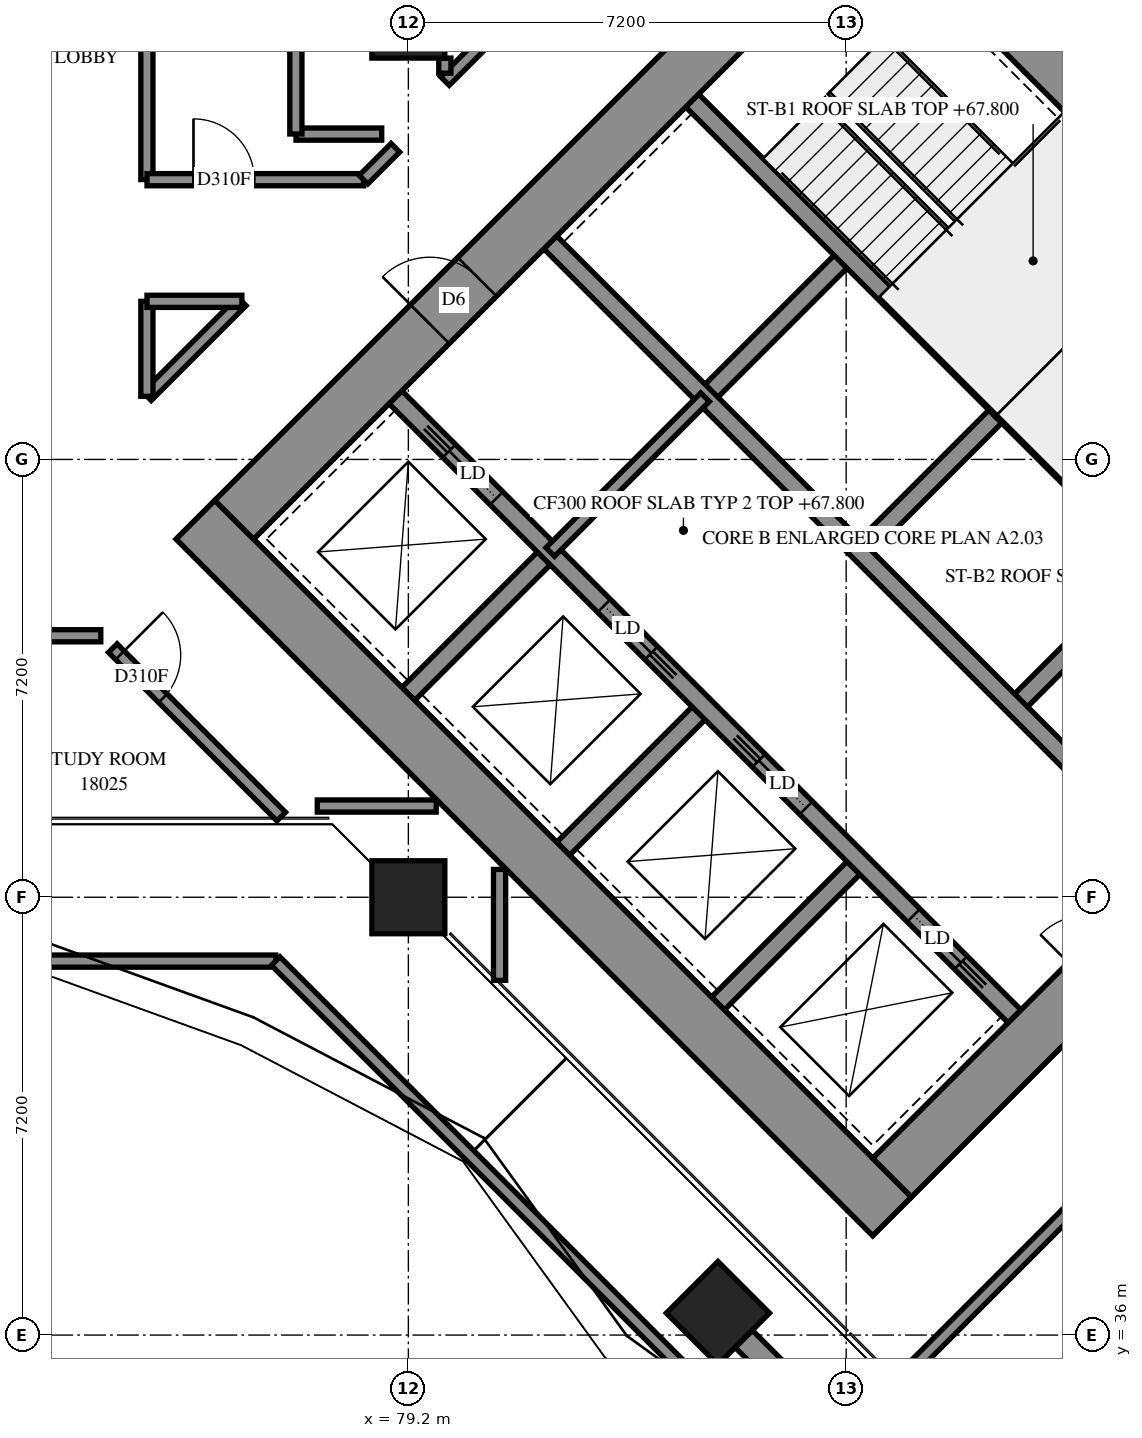
"""IFC4 building model, lengths in metres.
Left out: names, types, materials, properties, quantities, classifications, styles, units other than length and angle.
Written with IfcOpenShell. Run it as: python <this file> out.ifc"""

import sys

from ifc_helpers import new_model, si_unit, direction, frame, frame_2d, origin, origin_2d, place, context, subcontext, project, spatial, polyline, rectangle, outline, extrude, element, fill, save


model = new_model("IFC4")
c1 = context("Model", 3, precision=1e-05, world=origin(), true_north=direction((0.0, 1.0)))
c2 = subcontext(c1, "Body", "Model", "MODEL_VIEW")
j1 = project(units=[si_unit("LENGTHUNIT", "METRE"), si_unit("PLANEANGLEUNIT", "RADIAN")], contexts=[c1])
p1 = place(None, origin())
s1 = spatial("IfcSite", under=j1, at=p1, CompositionType="ELEMENT")
p2 = place(p1, origin())
s2 = spatial("IfcBuilding", under=s1, at=p2, CompositionType="ELEMENT")
p3 = place(p2, frame((0.0, 0.0, 67.8)))
s3 = spatial("IfcBuildingStorey", under=s2, at=p3, CompositionType="ELEMENT", Elevation=67.8)
for number, where, z_axis, x_axis in (
    (1, (79.2, 43.2, 0.0), (0.0, 0.0, 1.0), (1.0, 0.0, 0.0)),
    (2, (79.2, 57.6, 0.0), (0.0, 0.0, 1.0), (1.0, 0.0, 0.0)),
    (3, (84.291, 36.362, 0.0), (0.0, 0.0, 1.0), (0.707, -0.707, 0.0)),
):
    element("IfcColumn", number, at=place(p3, frame(where, z_axis=z_axis, x_axis=x_axis)), inside=s3, PredefinedType="COLUMN", context=c2, shape_type="SweptSolid", body=[
        extrude(rectangle(XDim=1.2, YDim=1.2, at=origin_2d()), origin(), (0.0, 0.0, 1.0), 3.9),
    ])
p4 = place(p3, frame((75.7, 49.408, -0.3), z_axis=(0.0, 0.0, 1.0), x_axis=(0.7071098676, -0.7071036948, 0.0)))
e4 = element("IfcWall", 4, at=p4, inside=s3, PredefinedType="SHEAR", context=c2, shape_type="SweptSolid", body=[
    extrude(rectangle(XDim=16.2, YDim=0.9, at=frame_2d((8.1, 0.0))), origin(), (0.0, 0.0, 1.0), 3.5),
])
p5 = place(p3, frame((86.519, 60.227, -0.3), z_axis=(0.0, 0.0, 1.0), x_axis=(0.7071036948, -0.7071098676, 0.0)))
e5 = element("IfcWall", 5, at=p5, inside=s3, PredefinedType="SHEAR", context=c2, shape_type="SweptSolid", body=[
    extrude(rectangle(XDim=16.2, YDim=0.9, at=frame_2d((8.1, 0.0))), origin(), (0.0, 0.0, 1.0), 3.5),
])
p6 = place(p5, frame((10.9, 0.0, 0.3)))
e6 = element("IfcOpeningElement", 6, at=p6, cuts=e5, PredefinedType="OPENING", context=c2, shape_type="SweptSolid", body=[
    extrude(rectangle(XDim=0.8, YDim=2.1, at=frame_2d((0.4, 1.05))), frame((0.0, 0.46, 0.0), z_axis=(0.0, -1.0, 0.0), x_axis=(1.0, 0.0, 0.0)), (0.0, 0.0, 1.0), 0.92),
])
p7 = place(p3, frame((76.336, 49.408, -0.3), z_axis=(0.0, 0.0, 1.0), x_axis=(0.7071067812, 0.7071067812, 0.0)))
e7 = element("IfcWall", 7, at=p7, inside=s3, PredefinedType="SHEAR", context=c2, shape_type="SweptSolid", body=[
    extrude(rectangle(XDim=14.4, YDim=0.9, at=frame_2d((7.2, 0.0))), origin(), (0.0, 0.0, 1.0), 3.5),
])
p8 = place(p7, frame((4.55, 0.0, 0.3)))
e8 = element("IfcOpeningElement", 8, at=p8, cuts=e7, PredefinedType="OPENING", context=c2, shape_type="SweptSolid", body=[
    extrude(rectangle(XDim=1.1, YDim=2.1, at=frame_2d((0.55, 1.05))), frame((0.0, 0.46, 0.0), z_axis=(0.0, -1.0, 0.0), x_axis=(1.0, 0.0, 0.0)), (0.0, 0.0, 1.0), 0.92),
])
p9 = place(p7, frame((11.35, 0.0, 0.3)))
e9 = element("IfcOpeningElement", 9, at=p9, cuts=e7, PredefinedType="OPENING", context=c2, shape_type="SweptSolid", body=[
    extrude(rectangle(XDim=1.1, YDim=2.1, at=frame_2d((0.55, 1.05))), frame((0.0, 0.46, 0.0), z_axis=(0.0, -1.0, 0.0), x_axis=(1.0, 0.0, 0.0)), (0.0, 0.0, 1.0), 0.92),
])
p10 = place(p3, frame((87.155, 38.589, -0.3), z_axis=(0.0, 0.0, 1.0), x_axis=(0.7071067812, 0.7071067812, 0.0)))
e10 = element("IfcWall", 10, at=p10, inside=s3, PredefinedType="SHEAR", context=c2, shape_type="SweptSolid", body=[
    extrude(rectangle(XDim=14.4, YDim=0.9, at=frame_2d((7.2, 0.0))), origin(), (0.0, 0.0, 1.0), 3.5),
])
p11 = place(p10, frame((4.55, 0.0, 0.3)))
e11 = element("IfcOpeningElement", 11, at=p11, cuts=e10, PredefinedType="OPENING", context=c2, shape_type="SweptSolid", body=[
    extrude(rectangle(XDim=1.1, YDim=2.1, at=frame_2d((0.55, 1.05))), frame((0.0, 0.46, 0.0), z_axis=(0.0, -1.0, 0.0), x_axis=(1.0, 0.0, 0.0)), (0.0, 0.0, 1.0), 0.92),
])
p12 = place(p10, frame((11.35, 0.0, 0.3)))
e12 = element("IfcOpeningElement", 12, at=p12, cuts=e10, PredefinedType="OPENING", context=c2, shape_type="SweptSolid", body=[
    extrude(rectangle(XDim=1.1, YDim=2.1, at=frame_2d((0.55, 1.05))), frame((0.0, 0.46, 0.0), z_axis=(0.0, -1.0, 0.0), x_axis=(1.0, 0.0, 0.0)), (0.0, 0.0, 1.0), 0.92),
])
for number, where, z_axis, x_axis in (
    (13, (79.2, 46.544, 0.0), (0.0, 0.0, 1.0), (0.707, 0.707, 0.0)),
    (14, (84.079, 51.423, 0.0), (0.0, 0.0, 1.0), (0.707, 0.707, 0.0)),
):
    element("IfcWall", number, at=place(p3, frame(where, z_axis=z_axis, x_axis=x_axis)), inside=s3, PredefinedType="SOLIDWALL", context=c2, shape_type="SweptSolid", body=[
        extrude(rectangle(XDim=3.3, YDim=0.3, at=frame_2d((1.65, 0.0))), origin(), (0.0, 0.0, 1.0), 3.9),
    ])
p13 = place(p3, frame((81.746, 43.999, 0.0), z_axis=(0.0, 0.0, 1.0), x_axis=(0.7071067812, 0.7071067812, 0.0)))
e15 = element("IfcWall", 15, at=p13, inside=s3, PredefinedType="SOLIDWALL", context=c2, shape_type="SweptSolid", body=[
    extrude(rectangle(XDim=3.3, YDim=0.3, at=frame_2d((1.65, 0.0))), origin(), (0.0, 0.0, 1.0), 3.9),
])
p14 = place(p3, frame((86.625, 48.878, 0.0), z_axis=(0.0, 0.0, 1.0), x_axis=(0.7071067812, 0.7071067812, 0.0)))
e16 = element("IfcWall", 16, at=p14, inside=s3, PredefinedType="SOLIDWALL", context=c2, shape_type="SweptSolid", body=[
    extrude(rectangle(XDim=3.3, YDim=0.3, at=frame_2d((1.65, 0.0))), origin(), (0.0, 0.0, 1.0), 3.9),
])
p15 = place(p3, frame((84.291, 41.453, 0.0), z_axis=(0.0, 0.0, 1.0), x_axis=(0.7071067812, 0.7071067812, 0.0)))
e17 = element("IfcWall", 17, at=p15, inside=s3, PredefinedType="SOLIDWALL", context=c2, shape_type="SweptSolid", body=[
    extrude(rectangle(XDim=3.3, YDim=0.3, at=frame_2d((1.65, 0.0))), origin(), (0.0, 0.0, 1.0), 3.9),
])
p16 = place(p3, frame((89.17, 46.332, 0.0), z_axis=(0.0, 0.0, 1.0), x_axis=(0.7071067812, 0.7071067812, 0.0)))
e18 = element("IfcWall", 18, at=p16, inside=s3, PredefinedType="SOLIDWALL", context=c2, shape_type="SweptSolid", body=[
    extrude(rectangle(XDim=3.3, YDim=0.3, at=frame_2d((1.65, 0.0))), origin(), (0.0, 0.0, 1.0), 3.9),
])
p17 = place(p3, frame((78.988, 51.423, 0.0), z_axis=(0.0, 0.0, 1.0), x_axis=(0.7071067812, -0.7071067812, 0.0)))
e19 = element("IfcWall", 19, at=p17, inside=s3, PredefinedType="SOLIDWALL", context=c2, shape_type="SweptSolid", body=[
    extrude(rectangle(XDim=14.4, YDim=0.3, at=frame_2d((7.2, 0.0))), origin(), (0.0, 0.0, 1.0), 3.9),
])
p18 = place(p17, frame((1.25, 0.0, 0.0)))
e20 = element("IfcOpeningElement", 20, at=p18, cuts=e19, PredefinedType="OPENING", context=c2, shape_type="SweptSolid", body=[
    extrude(rectangle(XDim=1.1, YDim=2.1, at=frame_2d((0.55, 1.05))), frame((0.0, 0.16, 0.0), z_axis=(0.0, -1.0, 0.0), x_axis=(1.0, 0.0, 0.0)), (0.0, 0.0, 1.0), 0.32),
])
p19 = place(p17, frame((4.85, 0.0, 0.0)))
e21 = element("IfcOpeningElement", 21, at=p19, cuts=e19, PredefinedType="OPENING", context=c2, shape_type="SweptSolid", body=[
    extrude(rectangle(XDim=1.1, YDim=2.1, at=frame_2d((0.55, 1.05))), frame((0.0, 0.16, 0.0), z_axis=(0.0, -1.0, 0.0), x_axis=(1.0, 0.0, 0.0)), (0.0, 0.0, 1.0), 0.32),
])
p20 = place(p17, frame((8.45, 0.0, 0.0)))
e22 = element("IfcOpeningElement", 22, at=p20, cuts=e19, PredefinedType="OPENING", context=c2, shape_type="SweptSolid", body=[
    extrude(rectangle(XDim=1.1, YDim=2.1, at=frame_2d((0.55, 1.05))), frame((0.0, 0.16, 0.0), z_axis=(0.0, -1.0, 0.0), x_axis=(1.0, 0.0, 0.0)), (0.0, 0.0, 1.0), 0.32),
])
p21 = place(p17, frame((12.05, 0.0, 0.0)))
e23 = element("IfcOpeningElement", 23, at=p21, cuts=e19, PredefinedType="OPENING", context=c2, shape_type="SweptSolid", body=[
    extrude(rectangle(XDim=1.1, YDim=2.1, at=frame_2d((0.55, 1.05))), frame((0.0, 0.16, 0.0), z_axis=(0.0, -1.0, 0.0), x_axis=(1.0, 0.0, 0.0)), (0.0, 0.0, 1.0), 0.32),
])
p22 = place(p3, frame((81.534, 53.969, 0.0), z_axis=(0.0, 0.0, 1.0), x_axis=(0.707103309, -0.7071102534, 0.0)))
e24 = element("IfcWall", 24, at=p22, inside=s3, PredefinedType="SOLIDWALL", context=c2, shape_type="SweptSolid", body=[
    extrude(rectangle(XDim=14.4, YDim=0.3, at=frame_2d((7.2, 0.0))), origin(), (0.0, 0.0, 1.0), 3.9),
])
p23 = place(p22, frame((12.05, 0.0, 0.0)))
e25 = element("IfcOpeningElement", 25, at=p23, cuts=e24, PredefinedType="OPENING", context=c2, shape_type="SweptSolid", body=[
    extrude(rectangle(XDim=1.1, YDim=2.1, at=frame_2d((0.55, 1.05))), frame((0.0, 0.16, 0.0), z_axis=(0.0, -1.0, 0.0), x_axis=(1.0, 0.0, 0.0)), (0.0, 0.0, 1.0), 0.32),
])
for number, where, z_axis, x_axis in (
    (26, (83.867, 56.302, 0.0), (0.0, 0.0, 1.0), (0.707, -0.707, 0.0)),
    (27, (88.958, 51.211, 0.0), (0.0, 0.0, 1.0), (0.707, -0.707, 0.0)),
):
    element("IfcWall", number, at=place(p3, frame(where, z_axis=z_axis, x_axis=x_axis)), inside=s3, PredefinedType="SOLIDWALL", context=c2, shape_type="SweptSolid", body=[
        extrude(rectangle(XDim=7.2, YDim=0.3, at=frame_2d((3.6, 0.0))), origin(), (0.0, 0.0, 1.0), 3.9),
    ])
p24 = place(p3, frame((88.958, 51.211, 0.0), z_axis=(0.0, 0.0, 1.0), x_axis=(0.7071067812, 0.7071067812, 0.0)))
e28 = element("IfcWall", 28, at=p24, inside=s3, PredefinedType="SOLIDWALL", context=c2, shape_type="SweptSolid", body=[
    extrude(rectangle(XDim=4.2, YDim=0.3, at=frame_2d((2.1, 0.0))), origin(), (0.0, 0.0, 1.0), 3.9),
])
p25 = place(p3, frame((112.929, 39.756, 0.0), z_axis=(0.0, 0.0, 1.0), x_axis=(-0.7071067812, 0.7071067812, 0.0)))
e29 = element("IfcWall", 29, at=p25, inside=s3, PredefinedType="SOLIDWALL", context=c2, shape_type="SweptSolid", body=[
    extrude(outline(polyline([(-0.1, -0.1), (47.126, -0.1), (47.044, 0.1), (0.1, 0.1), (-0.1, -0.1)])), origin(), (0.0, 0.0, 1.0), 4.2),
])
p26 = place(p3, frame((49.35, 42.15, 0.0), z_axis=(0.0, 0.0, 1.0), x_axis=(1.0, 0.0, 0.0)))
e30 = element("IfcWall", 30, at=p26, inside=s3, PredefinedType="SOLIDWALL", context=c2, shape_type="SweptSolid", body=[
    extrude(outline(polyline([(-0.1, -0.1), (27.627, -0.1), (27.709, 0.1), (0.1, 0.1), (-0.1, -0.1)])), origin(), (0.0, 0.0, 1.0), 4.2),
])
p27 = place(p3, frame((77.018, 42.15, 0.0), z_axis=(0.0, 0.0, 1.0), x_axis=(0.7071067812, -0.7071067812, 0.0)))
e31 = element("IfcWall", 31, at=p27, inside=s3, PredefinedType="SOLIDWALL", context=c2, shape_type="SweptSolid", body=[
    extrude(outline(polyline([(0.041, -0.1), (31.986, -0.1), (31.786, 0.1), (-0.041, 0.1), (0.041, -0.1)])), origin(), (0.0, 0.0, 1.0), 4.2),
])
p28 = place(p3, frame((81.534, 48.878, 0.0), z_axis=(0.0, 0.0, 1.0), x_axis=(0.707092892, 0.7071206701, 0.0)))
e32 = element("IfcWall", 32, at=p28, inside=s3, PredefinedType="PARTITIONING", context=c2, shape_type="SweptSolid", body=[
    extrude(rectangle(XDim=3.6, YDim=0.2, at=frame_2d((1.8, 0.0))), origin(), (0.0, 0.0, 1.0), 3.9),
])
p29 = place(p3, frame((54.7, 47.5, 0.0), z_axis=(0.0, 0.0, 1.0), x_axis=(1.0, 0.0, 0.0)))
e33 = element("IfcWall", 33, at=p29, inside=s3, PredefinedType="PARTITIONING", context=c2, shape_type="SweptSolid", body=[
    extrude(rectangle(XDim=19.442, YDim=0.2, at=frame_2d((9.721, 0.0))), origin(), (0.0, 0.0, 1.0), 3.9),
])
p30 = place(p29, frame((4.933, 0.0, 0.0)))
e34 = element("IfcOpeningElement", 34, at=p30, cuts=e33, PredefinedType="OPENING", context=c2, shape_type="SweptSolid", body=[
    extrude(rectangle(XDim=1.0, YDim=2.1, at=frame_2d((0.5, 1.05))), frame((0.0, 0.11, 0.0), z_axis=(0.0, -1.0, 0.0), x_axis=(1.0, 0.0, 0.0)), (0.0, 0.0, 1.0), 0.22),
])
p31 = place(p29, frame((7.008, 0.0, 0.0)))
e35 = element("IfcOpeningElement", 35, at=p31, cuts=e33, PredefinedType="OPENING", context=c2, shape_type="SweptSolid", body=[
    extrude(rectangle(XDim=1.0, YDim=2.1, at=frame_2d((0.5, 1.05))), frame((0.0, 0.11, 0.0), z_axis=(0.0, -1.0, 0.0), x_axis=(1.0, 0.0, 0.0)), (0.0, 0.0, 1.0), 0.22),
])
p32 = place(p29, frame((12.133, 0.0, 0.0)))
e36 = element("IfcOpeningElement", 36, at=p32, cuts=e33, PredefinedType="OPENING", context=c2, shape_type="SweptSolid", body=[
    extrude(rectangle(XDim=1.0, YDim=2.1, at=frame_2d((0.5, 1.05))), frame((0.0, 0.11, 0.0), z_axis=(0.0, -1.0, 0.0), x_axis=(1.0, 0.0, 0.0)), (0.0, 0.0, 1.0), 0.22),
])
p33 = place(p29, frame((14.207, 0.0, 0.0)))
e37 = element("IfcOpeningElement", 37, at=p33, cuts=e33, PredefinedType="OPENING", context=c2, shape_type="SweptSolid", body=[
    extrude(rectangle(XDim=1.0, YDim=2.1, at=frame_2d((0.5, 1.05))), frame((0.0, 0.11, 0.0), z_axis=(0.0, -1.0, 0.0), x_axis=(1.0, 0.0, 0.0)), (0.0, 0.0, 1.0), 0.22),
])
p34 = place(p3, frame((87.281, 35.252, 0.0), z_axis=(0.0, 0.0, 1.0), x_axis=(0.7071067812, 0.7071067812, 0.0)))
e38 = element("IfcWall", 38, at=p34, inside=s3, PredefinedType="PARTITIONING", context=c2, shape_type="SweptSolid", body=[
    extrude(rectangle(XDim=8.468, YDim=0.2, at=frame_2d((4.234, 0.0))), origin(), (0.0, 0.0, 1.0), 3.9),
])
p35 = place(p3, frame((74.9, 55.002, 0.0), z_axis=(0.0, 0.0, 1.0), x_axis=(0.0, 1.0, 0.0)))
e39 = element("IfcWall", 39, at=p35, inside=s3, PredefinedType="PARTITIONING", context=c2, shape_type="SweptSolid", body=[
    extrude(rectangle(XDim=4.608, YDim=0.2, at=frame_2d((2.304, 0.0))), origin(), (0.0, 0.0, 1.0), 3.9),
])
p36 = place(p3, frame((74.339, 47.297, 0.0), z_axis=(0.0, 0.0, 1.0), x_axis=(0.7071067812, -0.7071067812, 0.0)))
e40 = element("IfcWall", 40, at=p36, inside=s3, PredefinedType="PARTITIONING", context=c2, shape_type="SweptSolid", body=[
    extrude(rectangle(XDim=3.917, YDim=0.2, at=frame_2d((1.959, 0.0))), origin(), (0.0, 0.0, 1.0), 3.9),
])
p37 = place(p36, frame((0.165, 0.0, 0.0)))
e41 = element("IfcOpeningElement", 41, at=p37, cuts=e40, PredefinedType="OPENING", context=c2, shape_type="SweptSolid", body=[
    extrude(rectangle(XDim=1.0, YDim=2.1, at=frame_2d((0.5, 1.05))), frame((0.0, 0.11, 0.0), z_axis=(0.0, -1.0, 0.0), x_axis=(1.0, 0.0, 0.0)), (0.0, 0.0, 1.0), 0.22),
])
p38 = place(p3, frame((74.902, 55.0, 0.0), z_axis=(0.0, 0.0, 1.0), x_axis=(1.0, 0.0, 0.0)))
e42 = element("IfcWall", 42, at=p38, inside=s3, PredefinedType="PARTITIONING", context=c2, shape_type="SweptSolid", body=[
    extrude(rectangle(XDim=3.562, YDim=0.2, at=frame_2d((1.781, 0.0))), origin(), (0.0, 0.0, 1.0), 3.9),
])
p39 = place(p38, frame((0.764, 0.0, 0.0)))
e43 = element("IfcOpeningElement", 43, at=p39, cuts=e42, PredefinedType="OPENING", context=c2, shape_type="SweptSolid", body=[
    extrude(rectangle(XDim=1.0, YDim=2.1, at=frame_2d((0.5, 1.05))), frame((0.0, 0.11, 0.0), z_axis=(0.0, -1.0, 0.0), x_axis=(1.0, 0.0, 0.0)), (0.0, 0.0, 1.0), 0.22),
])
p40 = place(p3, frame((74.899, 59.607, 0.0), z_axis=(0.0, 0.0, 1.0), x_axis=(0.7071067812, -0.7071067812, 0.0)))
e44 = element("IfcWall", 44, at=p40, inside=s3, PredefinedType="PARTITIONING", context=c2, shape_type="SweptSolid", body=[
    extrude(rectangle(XDim=3.462, YDim=0.2, at=frame_2d((1.731, 0.0))), origin(), (0.0, 0.0, 1.0), 3.9),
])
p41 = place(p3, frame((74.901, 51.439, 0.0), z_axis=(0.0, 0.0, 1.0), x_axis=(0.7071067812, 0.7071067812, 0.0)))
e45 = element("IfcWall", 45, at=p41, inside=s3, PredefinedType="PARTITIONING", context=c2, shape_type="SweptSolid", body=[
    extrude(rectangle(XDim=2.206, YDim=0.2, at=frame_2d((1.103, 0.0))), origin(), (0.0, 0.0, 1.0), 3.9),
])
p42 = place(p3, frame((77.702, 44.7, 0.0), z_axis=(0.0, 0.0, 1.0), x_axis=(1.0, 0.0, 0.0)))
e46 = element("IfcWall", 46, at=p42, inside=s3, PredefinedType="PARTITIONING", context=c2, shape_type="SweptSolid", body=[
    extrude(rectangle(XDim=1.956, YDim=0.2, at=frame_2d((0.978, 0.0))), origin(), (0.0, 0.0, 1.0), 3.9),
])
p43 = place(p3, frame((80.7, 41.834, 0.0), z_axis=(0.0, 0.0, 1.0), x_axis=(0.0, 1.0, 0.0)))
e47 = element("IfcWall", 47, at=p43, inside=s3, PredefinedType="PARTITIONING", context=c2, shape_type="SweptSolid", body=[
    extrude(rectangle(XDim=1.824, YDim=0.2, at=frame_2d((0.912, 0.0))), origin(), (0.0, 0.0, 1.0), 3.9),
])
p44 = place(p3, frame((79.802, 56.623, 0.0), z_axis=(0.0, 0.0, 1.0), x_axis=(0.7071067812, 0.7071067812, 0.0)))
e48 = element("IfcWall", 48, at=p44, inside=s3, PredefinedType="PARTITIONING", context=c2, shape_type="SweptSolid", body=[
    extrude(rectangle(XDim=1.765, YDim=0.2, at=frame_2d((0.882, 0.0))), origin(), (0.0, 0.0, 1.0), 3.9),
])
p45 = place(p3, frame((74.9, 51.438, 0.0), z_axis=(0.0, 0.0, 1.0), x_axis=(0.0, 1.0, 0.0)))
e49 = element("IfcWall", 49, at=p45, inside=s3, PredefinedType="PARTITIONING", context=c2, shape_type="SweptSolid", body=[
    extrude(rectangle(XDim=1.562, YDim=0.2, at=frame_2d((0.781, 0.0))), origin(), (0.0, 0.0, 1.0), 3.9),
])
p46 = place(p3, frame((74.902, 53.0, 0.0), z_axis=(0.0, 0.0, 1.0), x_axis=(1.0, 0.0, 0.0)))
e50 = element("IfcWall", 50, at=p46, inside=s3, PredefinedType="PARTITIONING", context=c2, shape_type="SweptSolid", body=[
    extrude(rectangle(XDim=1.56, YDim=0.2, at=frame_2d((0.78, 0.0))), origin(), (0.0, 0.0, 1.0), 3.9),
])
for number, where, z_axis, x_axis in (
    (51, (77.352, 55.75, 0.0), (0.0, 0.0, 1.0), (1.0, 0.0, 0.0)),
    (52, (77.35, 55.752, 0.0), (0.0, 0.0, 1.0), (0.0, 1.0, 0.0)),
):
    element("IfcWall", number, at=place(p3, frame(where, z_axis=z_axis, x_axis=x_axis)), inside=s3, PredefinedType="PARTITIONING", context=c2, shape_type="SweptSolid", body=[
        extrude(rectangle(XDim=1.41, YDim=0.2, at=frame_2d((0.705, 0.0))), origin(), (0.0, 0.0, 1.0), 3.9),
    ])
p47 = place(p3, frame((78.463, 55.001, 0.0), z_axis=(0.0, 0.0, 1.0), x_axis=(0.7071067812, 0.7071067812, 0.0)))
e53 = element("IfcWall", 53, at=p47, inside=s3, PredefinedType="PARTITIONING", context=c2, shape_type="SweptSolid", body=[
    extrude(rectangle(XDim=0.741, YDim=0.2, at=frame_2d((0.37, 0.0))), origin(), (0.0, 0.0, 1.0), 3.9),
])
p48 = place(p3, frame((79.8, 56.752, 0.0), z_axis=(0.0, 0.0, 1.0), x_axis=(0.0, 1.0, 0.0)))
e54 = element("IfcWall", 54, at=p48, inside=s3, PredefinedType="PARTITIONING", context=c2, shape_type="SweptSolid", body=[
    extrude(rectangle(XDim=0.248, YDim=0.2, at=frame_2d((0.124, 0.0))), origin(), (0.0, 0.0, 1.0), 3.9),
])
p49 = place(p8, origin())
e55 = element("IfcDoor", 55, at=p49, inside=s3, OperationType="DOUBLE_DOOR_SINGLE_SWING", PredefinedType="DOOR", context=c2, shape_type="SweptSolid", body=[
    extrude(rectangle(XDim=1.1, YDim=2.1, at=frame_2d((0.55, 1.05))), frame((0.0, 0.025, 0.0), z_axis=(0.0, -1.0, 0.0), x_axis=(1.0, 0.0, 0.0)), (0.0, 0.0, 1.0), 0.05),
])
fill(e8, e55)
p50 = place(p18, origin())
e56 = element("IfcDoor", 56, at=p50, inside=s3, OperationType="SLIDING_TO_LEFT", PredefinedType="DOOR", context=c2, shape_type="SweptSolid", body=[
    extrude(rectangle(XDim=1.1, YDim=2.1, at=frame_2d((0.55, 1.05))), frame((0.0, 0.025, 0.0), z_axis=(0.0, -1.0, 0.0), x_axis=(1.0, 0.0, 0.0)), (0.0, 0.0, 1.0), 0.05),
])
fill(e20, e56)
p51 = place(p19, origin())
e57 = element("IfcDoor", 57, at=p51, inside=s3, OperationType="SLIDING_TO_RIGHT", PredefinedType="DOOR", context=c2, shape_type="SweptSolid", body=[
    extrude(rectangle(XDim=1.1, YDim=2.1, at=frame_2d((0.55, 1.05))), frame((0.0, 0.025, 0.0), z_axis=(0.0, -1.0, 0.0), x_axis=(1.0, 0.0, 0.0)), (0.0, 0.0, 1.0), 0.05),
])
fill(e21, e57)
p52 = place(p20, origin())
e58 = element("IfcDoor", 58, at=p52, inside=s3, OperationType="SLIDING_TO_LEFT", PredefinedType="DOOR", context=c2, shape_type="SweptSolid", body=[
    extrude(rectangle(XDim=1.1, YDim=2.1, at=frame_2d((0.55, 1.05))), frame((0.0, 0.025, 0.0), z_axis=(0.0, -1.0, 0.0), x_axis=(1.0, 0.0, 0.0)), (0.0, 0.0, 1.0), 0.05),
])
fill(e22, e58)
p53 = place(p21, origin())
e59 = element("IfcDoor", 59, at=p53, inside=s3, OperationType="SLIDING_TO_RIGHT", PredefinedType="DOOR", context=c2, shape_type="SweptSolid", body=[
    extrude(rectangle(XDim=1.1, YDim=2.1, at=frame_2d((0.55, 1.05))), frame((0.0, 0.025, 0.0), z_axis=(0.0, -1.0, 0.0), x_axis=(1.0, 0.0, 0.0)), (0.0, 0.0, 1.0), 0.05),
])
fill(e23, e59)
p54 = place(p37, origin())
e60 = element("IfcDoor", 60, at=p54, inside=s3, OperationType="SINGLE_SWING_LEFT", PredefinedType="DOOR", context=c2, shape_type="SweptSolid", body=[
    extrude(rectangle(XDim=1.0, YDim=2.1, at=frame_2d((0.5, 1.05))), frame((0.0, 0.025, 0.0), z_axis=(0.0, -1.0, 0.0), x_axis=(1.0, 0.0, 0.0)), (0.0, 0.0, 1.0), 0.05),
])
fill(e41, e60)
p55 = place(p39, origin())
e61 = element("IfcDoor", 61, at=p55, inside=s3, OperationType="SINGLE_SWING_LEFT", PredefinedType="DOOR", context=c2, shape_type="SweptSolid", body=[
    extrude(rectangle(XDim=1.0, YDim=2.1, at=frame_2d((0.5, 1.05))), frame((0.0, 0.025, 0.0), z_axis=(0.0, -1.0, 0.0), x_axis=(1.0, 0.0, 0.0)), (0.0, 0.0, 1.0), 0.05),
])
fill(e43, e61)
save(model, sys.argv[1])
